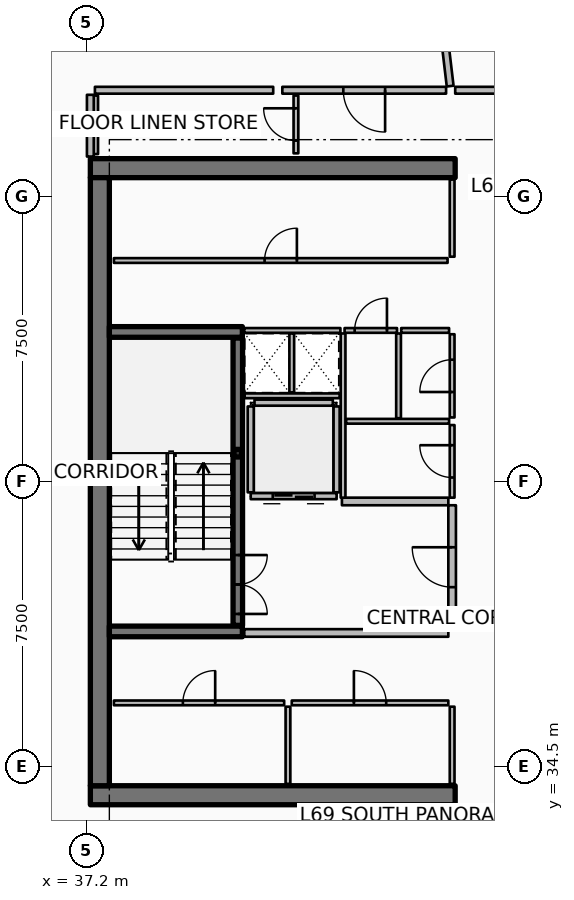
"""IFC4 building model, lengths in metres.
Left out: names, types, materials, properties, quantities, classifications, styles, units other than length and angle.
Written with IfcOpenShell. Run it as: python <this file> out.ifc"""

import sys

from ifc_helpers import new_model, si_unit, direction, frame, frame_2d, origin, origin_2d, place, context, subcontext, project, spatial, rectangle, hollow_rectangle, extrude, element, fill, save


model = new_model("IFC4")
c1 = context("Model", 3, precision=1e-05, world=origin(), true_north=direction((0.0, 1.0)))
c2 = subcontext(c1, "Body", "Model", "MODEL_VIEW")
j1 = project(units=[si_unit("LENGTHUNIT", "METRE"), si_unit("PLANEANGLEUNIT", "RADIAN")], contexts=[c1])
p1 = place(None, origin())
s1 = spatial("IfcSite", under=j1, at=p1, CompositionType="ELEMENT")
p2 = place(p1, origin())
s2 = spatial("IfcBuilding", under=s1, at=p2, CompositionType="ELEMENT")
p3 = place(p2, frame((0.0, 0.0, 275.2)))
s3 = spatial("IfcBuildingStorey", under=s2, at=p3, CompositionType="ELEMENT", Elevation=275.2)
for number, where, z_axis, x_axis in (
    (1, (37.3, 33.75, 0.0), (0.0, 0.0, 1.0), (1.0, 0.0, 0.0)),
    (2, (37.3, 50.25, 0.0), (0.0, 0.0, 1.0), (1.0, 0.0, 0.0)),
):
    element("IfcWall", number, at=place(p3, frame(where, z_axis=z_axis, x_axis=x_axis)), inside=s3, PredefinedType="SHEAR", context=c2, shape_type="SweptSolid", body=[
        extrude(rectangle(XDim=9.6, YDim=0.5, at=frame_2d((4.8, 0.0))), origin(), (0.0, 0.0, 1.0), 3.85),
    ])
p4 = place(p3, frame((37.55, 34.0, 0.0), z_axis=(0.0, 0.0, 1.0), x_axis=(0.0, 1.0, 0.0)))
e3 = element("IfcWall", 3, at=p4, inside=s3, PredefinedType="SHEAR", context=c2, shape_type="SweptSolid", body=[
    extrude(rectangle(XDim=16.0, YDim=0.5, at=frame_2d((8.0, 0.0))), origin(), (0.0, 0.0, 1.0), 3.85),
])
for number, where, z_axis, x_axis in (
    (4, (37.8, 38.06, 0.0), (0.0, 0.0, 1.0), (1.0, 0.0, 0.0)),
    (5, (37.8, 45.94, 0.0), (0.0, 0.0, 1.0), (1.0, 0.0, 0.0)),
):
    element("IfcWall", number, at=place(p3, frame(where, z_axis=z_axis, x_axis=x_axis)), inside=s3, PredefinedType="SHEAR", context=c2, shape_type="SweptSolid", body=[
        extrude(rectangle(XDim=3.5, YDim=0.28, at=frame_2d((1.75, 0.0))), origin(), (0.0, 0.0, 1.0), 3.85),
    ])
p5 = place(p3, frame((41.18, 42.75, 0.0), z_axis=(0.0, 0.0, 1.0), x_axis=(1.0, 0.0, 0.0)))
e6 = element("IfcColumn", 6, at=p5, inside=s3, PredefinedType="COLUMN", context=c2, shape_type="SweptSolid", body=[
    extrude(hollow_rectangle(XDim=0.2, YDim=0.2, WallThickness=0.01, InnerFilletRadius=0.01, OuterFilletRadius=0.02, at=origin_2d()), origin(), (0.0, 0.0, 1.0), 1.72),
])
p6 = place(p3, frame((41.18, 38.22, 0.0), z_axis=(0.0, 0.0, 1.0), x_axis=(0.0, 1.0, 0.0)))
e7 = element("IfcWall", 7, at=p6, inside=s3, PredefinedType="SOLIDWALL", context=c2, shape_type="SweptSolid", body=[
    extrude(rectangle(XDim=7.56, YDim=0.25, at=frame_2d((3.78, 0.0))), origin(), (0.0, 0.0, 1.0), 3.59),
])
p7 = place(p6, frame((0.3, 0.0, 0.0)))
e8 = element("IfcOpeningElement", 8, at=p7, cuts=e7, PredefinedType="OPENING", context=c2, shape_type="SweptSolid", body=[
    extrude(rectangle(XDim=1.55, YDim=2.15, at=frame_2d((0.775, 1.075))), frame((0.0, 0.135, 0.0), z_axis=(0.0, -1.0, 0.0), x_axis=(1.0, 0.0, 0.0)), (0.0, 0.0, 1.0), 0.27),
])
p8 = place(p3, frame((43.78, 41.62, 0.0), z_axis=(0.0, 0.0, 1.0), x_axis=(-1.0, 0.0, 0.0)))
e9 = element("IfcWall", 9, at=p8, inside=s3, PredefinedType="PARTITIONING", context=c2, shape_type="SweptSolid", body=[
    extrude(rectangle(XDim=2.26, YDim=0.16, at=frame_2d((1.13, 0.0))), origin(), (0.0, 0.0, 1.0), 3.59),
])
p9 = place(p8, frame((0.58, 0.0, 0.0)))
e10 = element("IfcOpeningElement", 10, at=p9, cuts=e9, PredefinedType="OPENING", context=c2, shape_type="SweptSolid", body=[
    extrude(rectangle(XDim=1.1, YDim=2.1, at=frame_2d((0.55, 1.05))), frame((0.0, 0.09, 0.0), z_axis=(0.0, -1.0, 0.0), x_axis=(1.0, 0.0, 0.0)), (0.0, 0.0, 1.0), 0.18),
])
for number, where, z_axis, x_axis in (
    (11, (43.78, 41.72, 0.0), (0.0, 0.0, 1.0), (0.0, 1.0, 0.0)),
    (12, (41.52, 41.72, 0.0), (0.0, 0.0, 1.0), (0.0, 1.0, 0.0)),
):
    element("IfcWall", number, at=place(p3, frame(where, z_axis=z_axis, x_axis=x_axis)), inside=s3, PredefinedType="PARTITIONING", context=c2, shape_type="SweptSolid", body=[
        extrude(rectangle(XDim=2.26, YDim=0.16, at=frame_2d((1.13, 0.0))), origin(), (0.0, 0.0, 1.0), 3.59),
    ])
p10 = place(p3, frame((41.62, 44.08, 0.0), z_axis=(0.0, 0.0, 1.0), x_axis=(1.0, 0.0, 0.0)))
e13 = element("IfcWall", 13, at=p10, inside=s3, PredefinedType="PARTITIONING", context=c2, shape_type="SweptSolid", body=[
    extrude(rectangle(XDim=2.06, YDim=0.16, at=frame_2d((1.03, 0.0))), origin(), (0.0, 0.0, 1.0), 3.59),
])
for number, where, z_axis, x_axis in (
    (14, (46.82, 34.05, 0.0), (0.0, 0.0, 1.0), (0.0, 1.0, 0.0)),
    (15, (42.5, 34.05, 0.0), (0.0, 0.0, 1.0), (0.0, 1.0, 0.0)),
):
    element("IfcWall", number, at=place(p3, frame(where, z_axis=z_axis, x_axis=x_axis)), inside=s3, PredefinedType="PARTITIONING", context=c2, shape_type="SweptSolid", body=[
        extrude(rectangle(XDim=2.03, YDim=0.125, at=frame_2d((1.015, 0.0))), origin(), (0.0, 0.0, 1.0), 3.03),
    ])
p11 = place(p3, frame((37.92, 36.18, 0.0), z_axis=(0.0, 0.0, 1.0), x_axis=(1.0, 0.0, 0.0)))
e16 = element("IfcWall", 16, at=p11, inside=s3, PredefinedType="PARTITIONING", context=c2, shape_type="SweptSolid", body=[
    extrude(rectangle(XDim=4.48, YDim=0.125, at=frame_2d((2.24, 0.0))), origin(), (0.0, 0.0, 1.0), 3.03),
])
p12 = place(p11, frame((1.815, 0.0, 0.0)))
e17 = element("IfcOpeningElement", 17, at=p12, cuts=e16, PredefinedType="OPENING", context=c2, shape_type="SweptSolid", body=[
    extrude(rectangle(XDim=0.85, YDim=2.06, at=frame_2d((0.425, 1.03))), frame((0.0, 0.073, 0.0), z_axis=(0.0, -1.0, 0.0), x_axis=(1.0, 0.0, 0.0)), (0.0, 0.0, 1.0), 0.145),
])
p13 = place(p3, frame((42.6, 36.18, 0.0), z_axis=(0.0, 0.0, 1.0), x_axis=(1.0, 0.0, 0.0)))
e18 = element("IfcWall", 18, at=p13, inside=s3, PredefinedType="PARTITIONING", context=c2, shape_type="SweptSolid", body=[
    extrude(rectangle(XDim=4.12, YDim=0.125, at=frame_2d((2.06, 0.0))), origin(), (0.0, 0.0, 1.0), 3.03),
])
p14 = place(p13, frame((1.635, 0.0, 0.0)))
e19 = element("IfcOpeningElement", 19, at=p14, cuts=e18, PredefinedType="OPENING", context=c2, shape_type="SweptSolid", body=[
    extrude(rectangle(XDim=0.85, YDim=2.06, at=frame_2d((0.425, 1.03))), frame((0.0, 0.073, 0.0), z_axis=(0.0, -1.0, 0.0), x_axis=(1.0, 0.0, 0.0)), (0.0, 0.0, 1.0), 0.145),
])
p15 = place(p3, frame((46.82, 47.92, 0.0), z_axis=(0.0, 0.0, 1.0), x_axis=(0.0, 1.0, 0.0)))
e20 = element("IfcWall", 20, at=p15, inside=s3, PredefinedType="PARTITIONING", context=c2, shape_type="SweptSolid", body=[
    extrude(rectangle(XDim=2.03, YDim=0.125, at=frame_2d((1.015, 0.0))), origin(), (0.0, 0.0, 1.0), 3.03),
])
p16 = place(p3, frame((37.92, 47.82, 0.0), z_axis=(0.0, 0.0, 1.0), x_axis=(1.0, 0.0, 0.0)))
e21 = element("IfcWall", 21, at=p16, inside=s3, PredefinedType="PARTITIONING", context=c2, shape_type="SweptSolid", body=[
    extrude(rectangle(XDim=8.78, YDim=0.125, at=frame_2d((4.39, 0.0))), origin(), (0.0, 0.0, 1.0), 3.03),
])
p17 = place(p16, frame((3.965, 0.0, 0.0)))
e22 = element("IfcOpeningElement", 22, at=p17, cuts=e21, PredefinedType="OPENING", context=c2, shape_type="SweptSolid", body=[
    extrude(rectangle(XDim=0.85, YDim=2.06, at=frame_2d((0.425, 1.03))), frame((0.0, 0.073, 0.0), z_axis=(0.0, -1.0, 0.0), x_axis=(1.0, 0.0, 0.0)), (0.0, 0.0, 1.0), 0.145),
])
p18 = place(p3, frame((41.35, 38.02, 0.0), z_axis=(0.0, 0.0, 1.0), x_axis=(1.0, 0.0, 0.0)))
e23 = element("IfcWall", 23, at=p18, inside=s3, PredefinedType="PARTITIONING", context=c2, shape_type="SweptSolid", body=[
    extrude(rectangle(XDim=5.37, YDim=0.2, at=frame_2d((2.685, 0.0))), origin(), (0.0, 0.0, 1.0), 3.59),
])
p19 = place(p3, frame((43.92, 41.48, 0.0), z_axis=(0.0, 0.0, 1.0), x_axis=(1.0, 0.0, 0.0)))
e24 = element("IfcWall", 24, at=p19, inside=s3, PredefinedType="PARTITIONING", context=c2, shape_type="SweptSolid", body=[
    extrude(rectangle(XDim=2.8, YDim=0.2, at=frame_2d((1.4, 0.0))), origin(), (0.0, 0.0, 1.0), 3.59),
])
p20 = place(p3, frame((46.82, 38.12, 0.0), z_axis=(0.0, 0.0, 1.0), x_axis=(0.0, 1.0, 0.0)))
e25 = element("IfcWall", 25, at=p20, inside=s3, PredefinedType="PARTITIONING", context=c2, shape_type="SweptSolid", body=[
    extrude(rectangle(XDim=3.26, YDim=0.2, at=frame_2d((1.63, 0.0))), origin(), (0.0, 0.0, 1.0), 3.59),
])
p21 = place(p20, frame((1.105, 0.0, 0.0)))
e26 = element("IfcOpeningElement", 26, at=p21, cuts=e25, PredefinedType="OPENING", context=c2, shape_type="SweptSolid", body=[
    extrude(rectangle(XDim=1.05, YDim=2.1, at=frame_2d((0.525, 1.05))), frame((0.0, 0.11, 0.0), z_axis=(0.0, -1.0, 0.0), x_axis=(1.0, 0.0, 0.0)), (0.0, 0.0, 1.0), 0.22),
])
p22 = place(p3, frame((41.36, 44.26, 0.0), z_axis=(0.0, 0.0, 1.0), x_axis=(1.0, 0.0, 0.0)))
e27 = element("IfcWall", 27, at=p22, inside=s3, PredefinedType="PARTITIONING", context=c2, shape_type="SweptSolid", body=[
    extrude(rectangle(XDim=2.5, YDim=0.125, at=frame_2d((1.25, 0.0))), origin(), (0.0, 0.0, 1.0), 3.03),
])
p23 = place(p3, frame((42.6, 44.35, 0.0), z_axis=(0.0, 0.0, 1.0), x_axis=(0.0, 1.0, 0.0)))
e28 = element("IfcWall", 28, at=p23, inside=s3, PredefinedType="PARTITIONING", context=c2, shape_type="SweptSolid", body=[
    extrude(rectangle(XDim=1.55, YDim=0.125, at=frame_2d((0.775, 0.0))), origin(), (0.0, 0.0, 1.0), 3.03),
])
p24 = place(p3, frame((43.95, 41.58, 0.0), z_axis=(0.0, 0.0, 1.0), x_axis=(0.0, 1.0, 0.0)))
e29 = element("IfcWall", 29, at=p24, inside=s3, PredefinedType="PARTITIONING", context=c2, shape_type="SweptSolid", body=[
    extrude(rectangle(XDim=4.32, YDim=0.125, at=frame_2d((2.16, 0.0))), origin(), (0.0, 0.0, 1.0), 3.03),
])
p25 = place(p3, frame((44.03, 43.59, 0.0), z_axis=(0.0, 0.0, 1.0), x_axis=(1.0, 0.0, 0.0)))
e30 = element("IfcWall", 30, at=p25, inside=s3, PredefinedType="PARTITIONING", context=c2, shape_type="SweptSolid", body=[
    extrude(rectangle(XDim=2.71, YDim=0.125, at=frame_2d((1.355, 0.0))), origin(), (0.0, 0.0, 1.0), 3.03),
])
p26 = place(p3, frame((45.41, 43.67, 0.0), z_axis=(0.0, 0.0, 1.0), x_axis=(0.0, 1.0, 0.0)))
e31 = element("IfcWall", 31, at=p26, inside=s3, PredefinedType="PARTITIONING", context=c2, shape_type="SweptSolid", body=[
    extrude(rectangle(XDim=2.23, YDim=0.125, at=frame_2d((1.115, 0.0))), origin(), (0.0, 0.0, 1.0), 3.03),
])
p27 = place(p3, frame((46.82, 41.58, 0.0), z_axis=(0.0, 0.0, 1.0), x_axis=(0.0, 1.0, 0.0)))
e32 = element("IfcWall", 32, at=p27, inside=s3, PredefinedType="PARTITIONING", context=c2, shape_type="SweptSolid", body=[
    extrude(rectangle(XDim=1.91, YDim=0.125, at=frame_2d((0.955, 0.0))), origin(), (0.0, 0.0, 1.0), 3.03),
])
p28 = place(p27, frame((0.53, 0.0, 0.0)))
e33 = element("IfcOpeningElement", 33, at=p28, cuts=e32, PredefinedType="OPENING", context=c2, shape_type="SweptSolid", body=[
    extrude(rectangle(XDim=0.85, YDim=2.06, at=frame_2d((0.425, 1.03))), frame((0.0, 0.073, 0.0), z_axis=(0.0, -1.0, 0.0), x_axis=(1.0, 0.0, 0.0)), (0.0, 0.0, 1.0), 0.145),
])
p29 = place(p3, frame((46.82, 43.69, 0.0), z_axis=(0.0, 0.0, 1.0), x_axis=(0.0, 1.0, 0.0)))
e34 = element("IfcWall", 34, at=p29, inside=s3, PredefinedType="PARTITIONING", context=c2, shape_type="SweptSolid", body=[
    extrude(rectangle(XDim=2.19, YDim=0.125, at=frame_2d((1.095, 0.0))), origin(), (0.0, 0.0, 1.0), 3.03),
])
p30 = place(p29, frame((0.67, 0.0, 0.0)))
e35 = element("IfcOpeningElement", 35, at=p30, cuts=e34, PredefinedType="OPENING", context=c2, shape_type="SweptSolid", body=[
    extrude(rectangle(XDim=0.85, YDim=2.06, at=frame_2d((0.425, 1.03))), frame((0.0, 0.073, 0.0), z_axis=(0.0, -1.0, 0.0), x_axis=(1.0, 0.0, 0.0)), (0.0, 0.0, 1.0), 0.145),
])
p31 = place(p3, frame((41.35, 45.98, 0.0), z_axis=(0.0, 0.0, 1.0), x_axis=(1.0, 0.0, 0.0)))
e36 = element("IfcWall", 36, at=p31, inside=s3, PredefinedType="PARTITIONING", context=c2, shape_type="SweptSolid", body=[
    extrude(rectangle(XDim=2.53, YDim=0.125, at=frame_2d((1.265, 0.0))), origin(), (0.0, 0.0, 1.0), 3.03),
])
p32 = place(p3, frame((43.99, 45.98, 0.0), z_axis=(0.0, 0.0, 1.0), x_axis=(1.0, 0.0, 0.0)))
e37 = element("IfcWall", 37, at=p32, inside=s3, PredefinedType="PARTITIONING", context=c2, shape_type="SweptSolid", body=[
    extrude(rectangle(XDim=1.38, YDim=0.125, at=frame_2d((0.69, 0.0))), origin(), (0.0, 0.0, 1.0), 3.03),
])
p33 = place(p32, frame((0.265, 0.0, 0.0)))
e38 = element("IfcOpeningElement", 38, at=p33, cuts=e37, PredefinedType="OPENING", context=c2, shape_type="SweptSolid", body=[
    extrude(rectangle(XDim=0.85, YDim=2.06, at=frame_2d((0.425, 1.03))), frame((0.0, 0.073, 0.0), z_axis=(0.0, -1.0, 0.0), x_axis=(1.0, 0.0, 0.0)), (0.0, 0.0, 1.0), 0.145),
])
p34 = place(p3, frame((45.48, 45.98, 0.0), z_axis=(0.0, 0.0, 1.0), x_axis=(1.0, 0.0, 0.0)))
e39 = element("IfcWall", 39, at=p34, inside=s3, PredefinedType="PARTITIONING", context=c2, shape_type="SweptSolid", body=[
    extrude(rectangle(XDim=1.26, YDim=0.125, at=frame_2d((0.63, 0.0))), origin(), (0.0, 0.0, 1.0), 3.03),
])
p35 = place(p3, frame((37.44, 50.62, 0.0), z_axis=(0.0, 0.0, 1.0), x_axis=(0.0, 1.0, 0.0)))
e40 = element("IfcWall", 40, at=p35, inside=s3, PredefinedType="PARTITIONING", context=c2, shape_type="SweptSolid", body=[
    extrude(rectangle(XDim=1.54, YDim=0.125, at=frame_2d((0.77, 0.0))), origin(), (0.0, 0.0, 1.0), 3.03),
])
p36 = place(p3, frame((42.71, 50.64, 0.0), z_axis=(0.0, 0.0, 1.0), x_axis=(0.0, 1.0, 0.0)))
e41 = element("IfcWall", 41, at=p36, inside=s3, PredefinedType="PARTITIONING", context=c2, shape_type="SweptSolid", body=[
    extrude(rectangle(XDim=1.52, YDim=0.125, at=frame_2d((0.76, 0.0))), origin(), (0.0, 0.0, 1.0), 2.957),
])
p37 = place(p36, frame((0.335, 0.0, 0.0)))
e42 = element("IfcOpeningElement", 42, at=p37, cuts=e41, PredefinedType="OPENING", context=c2, shape_type="SweptSolid", body=[
    extrude(rectangle(XDim=0.85, YDim=2.06, at=frame_2d((0.425, 1.03))), frame((0.0, 0.073, 0.0), z_axis=(0.0, -1.0, 0.0), x_axis=(1.0, 0.0, 0.0)), (0.0, 0.0, 1.0), 0.145),
])
p38 = place(p3, frame((46.768, 52.409, 0.0), z_axis=(0.0, 0.0, 1.0), x_axis=(-0.117545848714, 0.993067456646, 0.0)))
e43 = element("IfcWall", 43, at=p38, inside=s3, PredefinedType="PARTITIONING", context=c2, shape_type="SweptSolid", body=[
    extrude(rectangle(XDim=14.213, YDim=0.18, at=frame_2d((7.106, 0.0))), origin(), (0.0, 0.0, 1.0), 2.957),
])
p39 = place(p3, frame((46.661, 52.3, 0.0), z_axis=(0.0, 0.0, 1.0), x_axis=(-1.0, 0.0, 0.0)))
e44 = element("IfcWall", 44, at=p39, inside=s3, PredefinedType="PARTITIONING", context=c2, shape_type="SweptSolid", body=[
    extrude(rectangle(XDim=4.309, YDim=0.18, at=frame_2d((2.155, 0.0))), origin(), (0.0, 0.0, 1.0), 2.957),
])
p40 = place(p39, frame((1.604, 0.0, 0.0)))
e45 = element("IfcOpeningElement", 45, at=p40, cuts=e44, PredefinedType="OPENING", context=c2, shape_type="SweptSolid", body=[
    extrude(rectangle(XDim=1.1, YDim=2.1, at=frame_2d((0.55, 1.05))), frame((0.0, 0.1, 0.0), z_axis=(0.0, -1.0, 0.0), x_axis=(1.0, 0.0, 0.0)), (0.0, 0.0, 1.0), 0.2),
])
p41 = place(p3, frame((42.112, 52.3, 0.0), z_axis=(0.0, 0.0, 1.0), x_axis=(-1.0, 0.0, 0.0)))
e46 = element("IfcWall", 46, at=p41, inside=s3, PredefinedType="PARTITIONING", context=c2, shape_type="SweptSolid", body=[
    extrude(rectangle(XDim=4.692, YDim=0.18, at=frame_2d((2.346, 0.0))), origin(), (0.0, 0.0, 1.0), 2.957),
])
p42 = place(p3, frame((37.3, 52.18, 0.0), z_axis=(0.0, 0.0, 1.0), x_axis=(0.0, -1.0, 0.0)))
e47 = element("IfcWall", 47, at=p42, inside=s3, PredefinedType="PARTITIONING", context=c2, shape_type="SweptSolid", body=[
    extrude(rectangle(XDim=1.625, YDim=0.18, at=frame_2d((0.812, 0.0))), origin(), (0.0, 0.0, 1.0), 2.957),
])
p43 = place(p3, frame((50.785, 52.3, 0.0), z_axis=(0.0, 0.0, 1.0), x_axis=(-1.0, 0.0, 0.0)))
e48 = element("IfcWall", 48, at=p43, inside=s3, PredefinedType="PARTITIONING", context=c2, shape_type="SweptSolid", body=[
    extrude(rectangle(XDim=3.884, YDim=0.18, at=frame_2d((1.942, 0.0))), origin(), (0.0, 0.0, 1.0), 2.957),
])
p44 = place(p43, frame((1.392, 0.0, 0.0)))
e49 = element("IfcOpeningElement", 49, at=p44, cuts=e48, PredefinedType="OPENING", context=c2, shape_type="SweptSolid", body=[
    extrude(rectangle(XDim=1.1, YDim=2.1, at=frame_2d((0.55, 1.05))), frame((0.0, 0.1, 0.0), z_axis=(0.0, -1.0, 0.0), x_axis=(1.0, 0.0, 0.0)), (0.0, 0.0, 1.0), 0.2),
])
p45 = place(p7, origin())
e50 = element("IfcDoor", 50, at=p45, inside=s3, OperationType="DOUBLE_DOOR_SINGLE_SWING", PredefinedType="DOOR", context=c2, shape_type="SweptSolid", body=[
    extrude(rectangle(XDim=1.55, YDim=2.15, at=frame_2d((0.775, 1.075))), frame((0.0, 0.025, 0.0), z_axis=(0.0, -1.0, 0.0), x_axis=(1.0, 0.0, 0.0)), (0.0, 0.0, 1.0), 0.05),
])
fill(e8, e50)
p46 = place(p9, origin())
e51 = element("IfcDoor", 51, at=p46, inside=s3, OperationType="DOUBLE_DOOR_SLIDING", PredefinedType="DOOR", context=c2, shape_type="SweptSolid", body=[
    extrude(rectangle(XDim=1.1, YDim=2.1, at=frame_2d((0.55, 1.05))), frame((0.0, 0.025, 0.0), z_axis=(0.0, -1.0, 0.0), x_axis=(1.0, 0.0, 0.0)), (0.0, 0.0, 1.0), 0.05),
])
fill(e10, e51)
p47 = place(p12, origin())
e52 = element("IfcDoor", 52, at=p47, inside=s3, OperationType="SINGLE_SWING_RIGHT", PredefinedType="DOOR", context=c2, shape_type="SweptSolid", body=[
    extrude(rectangle(XDim=0.85, YDim=2.06, at=frame_2d((0.425, 1.03))), frame((0.0, 0.025, 0.0), z_axis=(0.0, -1.0, 0.0), x_axis=(1.0, 0.0, 0.0)), (0.0, 0.0, 1.0), 0.05),
])
fill(e17, e52)
p48 = place(p14, origin())
e53 = element("IfcDoor", 53, at=p48, inside=s3, OperationType="SINGLE_SWING_LEFT", PredefinedType="DOOR", context=c2, shape_type="SweptSolid", body=[
    extrude(rectangle(XDim=0.85, YDim=2.06, at=frame_2d((0.425, 1.03))), frame((0.0, 0.025, 0.0), z_axis=(0.0, -1.0, 0.0), x_axis=(1.0, 0.0, 0.0)), (0.0, 0.0, 1.0), 0.05),
])
fill(e19, e53)
p49 = place(p17, origin())
e54 = element("IfcDoor", 54, at=p49, inside=s3, OperationType="SINGLE_SWING_RIGHT", PredefinedType="DOOR", context=c2, shape_type="SweptSolid", body=[
    extrude(rectangle(XDim=0.85, YDim=2.06, at=frame_2d((0.425, 1.03))), frame((0.0, 0.025, 0.0), z_axis=(0.0, -1.0, 0.0), x_axis=(1.0, 0.0, 0.0)), (0.0, 0.0, 1.0), 0.05),
])
fill(e22, e54)
p50 = place(p21, origin())
e55 = element("IfcDoor", 55, at=p50, inside=s3, OperationType="SINGLE_SWING_RIGHT", PredefinedType="DOOR", context=c2, shape_type="SweptSolid", body=[
    extrude(rectangle(XDim=1.05, YDim=2.1, at=frame_2d((0.525, 1.05))), frame((0.0, 0.025, 0.0), z_axis=(0.0, -1.0, 0.0), x_axis=(1.0, 0.0, 0.0)), (0.0, 0.0, 1.0), 0.05),
])
fill(e26, e55)
p51 = place(p28, origin())
e56 = element("IfcDoor", 56, at=p51, inside=s3, OperationType="SINGLE_SWING_RIGHT", PredefinedType="DOOR", context=c2, shape_type="SweptSolid", body=[
    extrude(rectangle(XDim=0.85, YDim=2.06, at=frame_2d((0.425, 1.03))), frame((0.0, 0.025, 0.0), z_axis=(0.0, -1.0, 0.0), x_axis=(1.0, 0.0, 0.0)), (0.0, 0.0, 1.0), 0.05),
])
fill(e33, e56)
p52 = place(p30, origin())
e57 = element("IfcDoor", 57, at=p52, inside=s3, OperationType="SINGLE_SWING_LEFT", PredefinedType="DOOR", context=c2, shape_type="SweptSolid", body=[
    extrude(rectangle(XDim=0.85, YDim=2.06, at=frame_2d((0.425, 1.03))), frame((0.0, 0.025, 0.0), z_axis=(0.0, -1.0, 0.0), x_axis=(1.0, 0.0, 0.0)), (0.0, 0.0, 1.0), 0.05),
])
fill(e35, e57)
p53 = place(p33, origin())
e58 = element("IfcDoor", 58, at=p53, inside=s3, OperationType="SINGLE_SWING_RIGHT", PredefinedType="DOOR", context=c2, shape_type="SweptSolid", body=[
    extrude(rectangle(XDim=0.85, YDim=2.06, at=frame_2d((0.425, 1.03))), frame((0.0, 0.025, 0.0), z_axis=(0.0, -1.0, 0.0), x_axis=(1.0, 0.0, 0.0)), (0.0, 0.0, 1.0), 0.05),
])
fill(e38, e58)
p54 = place(p37, origin())
e59 = element("IfcDoor", 59, at=p54, inside=s3, OperationType="SINGLE_SWING_RIGHT", PredefinedType="DOOR", context=c2, shape_type="SweptSolid", body=[
    extrude(rectangle(XDim=0.85, YDim=2.06, at=frame_2d((0.425, 1.03))), frame((0.0, 0.025, 0.0), z_axis=(0.0, -1.0, 0.0), x_axis=(1.0, 0.0, 0.0)), (0.0, 0.0, 1.0), 0.05),
])
fill(e42, e59)
p55 = place(p40, origin())
e60 = element("IfcDoor", 60, at=p55, inside=s3, OperationType="SINGLE_SWING_LEFT", PredefinedType="DOOR", context=c2, shape_type="SweptSolid", body=[
    extrude(rectangle(XDim=1.1, YDim=2.1, at=frame_2d((0.55, 1.05))), frame((0.0, 0.025, 0.0), z_axis=(0.0, -1.0, 0.0), x_axis=(1.0, 0.0, 0.0)), (0.0, 0.0, 1.0), 0.05),
])
fill(e45, e60)
save(model, sys.argv[1])
